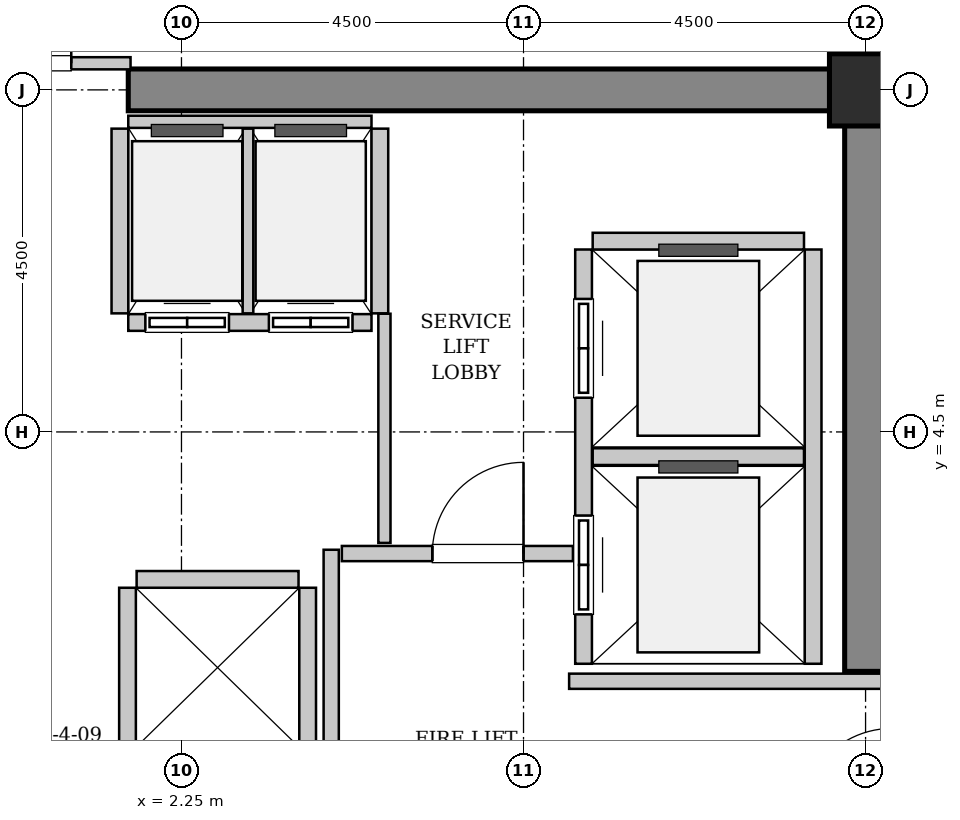
"""IFC4 building model, lengths in metres.
Left out: names, types, materials, properties, quantities, classifications, styles, units other than length and angle.
Written with IfcOpenShell. Run it as: python <this file> out.ifc"""

import sys

from ifc_helpers import new_model, si_unit, direction, frame, frame_2d, origin, origin_2d, place, context, subcontext, project, spatial, rectangle, hollow_rectangle, extrude, source, transform, mapped, element, fill, save


model = new_model("IFC4")
c1 = context("Model", 3, precision=1e-05, world=origin(), true_north=direction((0.0, 1.0)))
c2 = subcontext(c1, "Body", "Model", "MODEL_VIEW")
j1 = project(units=[si_unit("LENGTHUNIT", "METRE"), si_unit("PLANEANGLEUNIT", "RADIAN")], contexts=[c1])
p1 = place(None, origin())
s1 = spatial("IfcSite", under=j1, at=p1, CompositionType="ELEMENT")
p2 = place(p1, origin())
s2 = spatial("IfcBuilding", under=s1, at=p2, CompositionType="ELEMENT")
p3 = place(p2, frame((0.0, 0.0, 90.8)))
s3 = spatial("IfcBuildingStorey", under=s2, at=p3, CompositionType="ELEMENT", Elevation=90.8)
m1 = source(origin(), c2, "Body", "SweptSolid", [
    extrude(rectangle(XDim=9.975, YDim=0.55, at=frame_2d((4.987, 0.0))), origin(), (0.0, 0.0, 1.0), 3.8),
])
p4 = place(p3, frame((1.55, 9.0, 0.0), z_axis=(0.0, 0.0, 1.0), x_axis=(1.0, 0.0, 0.0)))
e1 = element("IfcWall", 1, at=p4, inside=s3, PredefinedType="SHEAR", context=c2, shape_type="MappedRepresentation", body=[
    mapped(m1, transform((0.0, 0.0, 0.0), x_axis=(1.0, 0.0, 0.0), y_axis=(0.0, 1.0, 0.0), z_axis=(0.0, 0.0, 1.0), scale=1.0)),
])
m2 = source(origin(), c2, "Body", "SweptSolid", [
    extrude(rectangle(XDim=7.375, YDim=0.55, at=frame_2d((3.688, 0.0))), origin(), (0.0, 0.0, 1.0), 3.8),
])
p5 = place(p3, frame((11.25, 1.35, 0.0), z_axis=(0.0, 0.0, 1.0), x_axis=(0.0, 1.0, 0.0)))
e2 = element("IfcWall", 2, at=p5, inside=s3, PredefinedType="SHEAR", context=c2, shape_type="MappedRepresentation", body=[
    mapped(m2, transform((0.0, 0.0, 0.0), x_axis=(1.0, 0.0, 0.0), y_axis=(0.0, 1.0, 0.0), z_axis=(0.0, 0.0, 1.0), scale=1.0)),
])
m3 = source(origin(), c2, "Body", "SweptSolid", [
    extrude(hollow_rectangle(XDim=0.95, YDim=0.95, WallThickness=0.045, InnerFilletRadius=0.045, OuterFilletRadius=0.09, at=origin_2d()), origin(), (0.0, 0.0, 1.0), 3.8),
])
p6 = place(p3, frame((11.25, 9.0, 0.0), z_axis=(0.0, 0.0, 1.0), x_axis=(1.0, 0.0, 0.0)))
e3 = element("IfcColumn", 3, at=p6, inside=s3, PredefinedType="COLUMN", context=c2, shape_type="MappedRepresentation", body=[
    mapped(m3, transform((0.0, 0.0, 0.0), x_axis=(1.0, 0.0, 0.0), y_axis=(0.0, 1.0, 0.0), z_axis=(0.0, 0.0, 1.0), scale=1.0)),
])
m4 = source(origin(), c2, "Body", "SweptSolid", [
    extrude(rectangle(XDim=5.45, YDim=0.22, at=frame_2d((2.725, 0.0))), origin(), (0.0, 0.0, 1.0), 3.535),
])
p7 = place(p3, frame((7.54, 6.9, 0.0), z_axis=(0.0, 0.0, 1.0), x_axis=(0.0, -1.0, 0.0)))
e4 = element("IfcWall", 4, at=p7, inside=s3, PredefinedType="SOLIDWALL", context=c2, shape_type="MappedRepresentation", body=[
    mapped(m4, transform((0.0, 0.0, 0.0), x_axis=(1.0, 0.0, 0.0), y_axis=(0.0, 1.0, 0.0), z_axis=(0.0, 0.0, 1.0), scale=1.0)),
])
p8 = place(p7, frame((3.5, 0.0, 0.0)))
e5 = element("IfcOpeningElement", 5, at=p8, cuts=e4, PredefinedType="OPENING", context=c2, shape_type="SweptSolid", body=[
    extrude(rectangle(XDim=1.3, YDim=2.3, at=frame_2d((0.65, 1.15))), frame((0.0, 0.12, 0.0), z_axis=(0.0, -1.0, 0.0), x_axis=(1.0, 0.0, 0.0)), (0.0, 0.0, 1.0), 0.24),
])
p9 = place(p7, frame((0.65, 0.0, 0.0)))
e6 = element("IfcOpeningElement", 6, at=p9, cuts=e4, PredefinedType="OPENING", context=c2, shape_type="SweptSolid", body=[
    extrude(rectangle(XDim=1.3, YDim=2.3, at=frame_2d((0.65, 1.15))), frame((0.0, 0.12, 0.0), z_axis=(0.0, -1.0, 0.0), x_axis=(1.0, 0.0, 0.0)), (0.0, 0.0, 1.0), 0.24),
])
p10 = place(p3, frame((10.56, 1.45, 0.0), z_axis=(0.0, 0.0, 1.0), x_axis=(0.0, 1.0, 0.0)))
e7 = element("IfcWall", 7, at=p10, inside=s3, PredefinedType="SOLIDWALL", context=c2, shape_type="MappedRepresentation", body=[
    mapped(m4, transform((0.0, 0.0, 0.0), x_axis=(1.0, 0.0, 0.0), y_axis=(0.0, 1.0, 0.0), z_axis=(0.0, 0.0, 1.0), scale=1.0)),
])
m5 = source(origin(), c2, "Body", "SweptSolid", [
    extrude(rectangle(XDim=2.78, YDim=0.22, at=frame_2d((1.39, 0.0))), origin(), (0.0, 0.0, 1.0), 3.535),
])
for number, where, z_axis, x_axis in (
    (8, (7.66, 4.175, 0.0), (0.0, 0.0, 1.0), (1.0, 0.0, 0.0)),
    (9, (10.44, 7.01, 0.0), (0.0, 0.0, 1.0), (-1.0, 0.0, 0.0)),
):
    element("IfcWall", number, at=place(p3, frame(where, z_axis=z_axis, x_axis=x_axis)), inside=s3, PredefinedType="SOLIDWALL", context=c2, shape_type="MappedRepresentation", body=[
        mapped(m5, transform((0.0, 0.0, 0.0), x_axis=(1.0, 0.0, 0.0), y_axis=(0.0, 1.0, 0.0), z_axis=(0.0, 0.0, 1.0), scale=1.0)),
    ])
m6 = source(origin(), c2, "Body", "SweptSolid", [
    extrude(rectangle(XDim=3.2, YDim=0.22, at=frame_2d((1.6, 0.0))), origin(), (0.0, 0.0, 1.0), 3.535),
])
p11 = place(p3, frame((1.55, 5.94, 0.0), z_axis=(0.0, 0.0, 1.0), x_axis=(1.0, 0.0, 0.0)))
e10 = element("IfcWall", 10, at=p11, inside=s3, PredefinedType="SOLIDWALL", context=c2, shape_type="MappedRepresentation", body=[
    mapped(m6, transform((0.0, 0.0, 0.0), x_axis=(1.0, 0.0, 0.0), y_axis=(0.0, 1.0, 0.0), z_axis=(0.0, 0.0, 1.0), scale=1.0)),
])
p12 = place(p11, frame((0.225, 0.0, 0.0)))
e11 = element("IfcOpeningElement", 11, at=p12, cuts=e10, PredefinedType="OPENING", context=c2, shape_type="SweptSolid", body=[
    extrude(rectangle(XDim=1.1, YDim=2.2, at=frame_2d((0.55, 1.1))), frame((0.0, 0.12, 0.0), z_axis=(0.0, -1.0, 0.0), x_axis=(1.0, 0.0, 0.0)), (0.0, 0.0, 1.0), 0.24),
])
p13 = place(p11, frame((1.85, 0.0, 0.0)))
e12 = element("IfcOpeningElement", 12, at=p13, cuts=e10, PredefinedType="OPENING", context=c2, shape_type="SweptSolid", body=[
    extrude(rectangle(XDim=1.1, YDim=2.2, at=frame_2d((0.55, 1.1))), frame((0.0, 0.12, 0.0), z_axis=(0.0, -1.0, 0.0), x_axis=(1.0, 0.0, 0.0)), (0.0, 0.0, 1.0), 0.24),
])
m7 = source(origin(), c2, "Body", "SweptSolid", [
    extrude(rectangle(XDim=3.2, YDim=0.16, at=frame_2d((1.6, 0.0))), origin(), (0.0, 0.0, 1.0), 2.425),
])
p14 = place(p3, frame((4.75, 8.58, 0.0), z_axis=(0.0, 0.0, 1.0), x_axis=(-1.0, 0.0, 0.0)))
e13 = element("IfcWall", 13, at=p14, inside=s3, PredefinedType="PARTITIONING", context=c2, shape_type="MappedRepresentation", body=[
    mapped(m7, transform((0.0, 0.0, 0.0), x_axis=(1.0, 0.0, 0.0), y_axis=(0.0, 1.0, 0.0), z_axis=(0.0, 0.0, 1.0), scale=1.0)),
])
m8 = source(origin(), c2, "Body", "SweptSolid", [
    extrude(rectangle(XDim=2.43, YDim=0.22, at=frame_2d((1.215, 0.0))), origin(), (0.0, 0.0, 1.0), 3.535),
])
p15 = place(p3, frame((1.44, 8.49, 0.0), z_axis=(0.0, 0.0, 1.0), x_axis=(0.0, -1.0, 0.0)))
e14 = element("IfcWall", 14, at=p15, inside=s3, PredefinedType="SOLIDWALL", context=c2, shape_type="MappedRepresentation", body=[
    mapped(m8, transform((0.0, 0.0, 0.0), x_axis=(1.0, 0.0, 0.0), y_axis=(0.0, 1.0, 0.0), z_axis=(0.0, 0.0, 1.0), scale=1.0)),
])
m9 = source(origin(), c2, "Body", "SweptSolid", [
    extrude(rectangle(XDim=2.43, YDim=0.14, at=frame_2d((1.215, 0.0))), origin(), (0.0, 0.0, 1.0), 3.535),
])
p16 = place(p3, frame((3.125, 6.06, 0.0), z_axis=(0.0, 0.0, 1.0), x_axis=(0.0, 1.0, 0.0)))
e15 = element("IfcWall", 15, at=p16, inside=s3, PredefinedType="PARTITIONING", context=c2, shape_type="MappedRepresentation", body=[
    mapped(m9, transform((0.0, 0.0, 0.0), x_axis=(1.0, 0.0, 0.0), y_axis=(0.0, 1.0, 0.0), z_axis=(0.0, 0.0, 1.0), scale=1.0)),
])
p17 = place(p3, frame((4.86, 6.06, 0.0), z_axis=(0.0, 0.0, 1.0), x_axis=(0.0, 1.0, 0.0)))
e16 = element("IfcWall", 16, at=p17, inside=s3, PredefinedType="SOLIDWALL", context=c2, shape_type="MappedRepresentation", body=[
    mapped(m8, transform((0.0, 0.0, 0.0), x_axis=(1.0, 0.0, 0.0), y_axis=(0.0, 1.0, 0.0), z_axis=(0.0, 0.0, 1.0), scale=1.0)),
])
m10 = source(origin(), c2, "Body", "SweptSolid", [
    extrude(rectangle(XDim=4.9, YDim=0.22, at=frame_2d((2.45, 0.0))), origin(), (0.0, 0.0, 1.0), 3.535),
])
for number, where, z_axis, x_axis in (
    (17, (1.54, 2.45, 0.0), (0.0, 0.0, 1.0), (0.0, -1.0, 0.0)),
    (18, (3.91, -2.45, 0.0), (0.0, 0.0, 1.0), (0.0, 1.0, 0.0)),
):
    element("IfcWall", number, at=place(p3, frame(where, z_axis=z_axis, x_axis=x_axis)), inside=s3, PredefinedType="SOLIDWALL", context=c2, shape_type="MappedRepresentation", body=[
        mapped(m10, transform((0.0, 0.0, 0.0), x_axis=(1.0, 0.0, 0.0), y_axis=(0.0, 1.0, 0.0), z_axis=(0.0, 0.0, 1.0), scale=1.0)),
    ])
m11 = source(origin(), c2, "Body", "SweptSolid", [
    extrude(rectangle(XDim=2.13, YDim=0.22, at=frame_2d((1.065, 0.0))), origin(), (0.0, 0.0, 1.0), 3.535),
])
p18 = place(p3, frame((3.79, 2.56, 0.0), z_axis=(0.0, 0.0, 1.0), x_axis=(-1.0, 0.0, 0.0)))
e19 = element("IfcWall", 19, at=p18, inside=s3, PredefinedType="SOLIDWALL", context=c2, shape_type="MappedRepresentation", body=[
    mapped(m11, transform((0.0, 0.0, 0.0), x_axis=(1.0, 0.0, 0.0), y_axis=(0.0, 1.0, 0.0), z_axis=(0.0, 0.0, 1.0), scale=1.0)),
])
m12 = source(origin(), c2, "Body", "SweptSolid", [
    extrude(rectangle(XDim=5.9, YDim=0.2, at=frame_2d((2.95, 0.0))), origin(), (0.0, 0.0, 1.0), 3.535),
])
p19 = place(p3, frame((4.22, -2.95, 0.0), z_axis=(0.0, 0.0, 1.0), x_axis=(0.0, 1.0, 0.0)))
e20 = element("IfcWall", 20, at=p19, inside=s3, PredefinedType="PARTITIONING", context=c2, shape_type="MappedRepresentation", body=[
    mapped(m12, transform((0.0, 0.0, 0.0), x_axis=(1.0, 0.0, 0.0), y_axis=(0.0, 1.0, 0.0), z_axis=(0.0, 0.0, 1.0), scale=1.0)),
])
m13 = source(origin(), c2, "Body", "SweptSolid", [
    extrude(rectangle(XDim=3.04, YDim=0.2, at=frame_2d((1.52, 0.0))), origin(), (0.0, 0.0, 1.0), 3.535),
])
p20 = place(p3, frame((4.36, 2.9, 0.0), z_axis=(0.0, 0.0, 1.0), x_axis=(1.0, 0.0, 0.0)))
e21 = element("IfcWall", 21, at=p20, inside=s3, PredefinedType="PARTITIONING", context=c2, shape_type="MappedRepresentation", body=[
    mapped(m13, transform((0.0, 0.0, 0.0), x_axis=(1.0, 0.0, 0.0), y_axis=(0.0, 1.0, 0.0), z_axis=(0.0, 0.0, 1.0), scale=1.0)),
])
p21 = place(p20, frame((1.19, 0.0, 0.0)))
e22 = element("IfcOpeningElement", 22, at=p21, cuts=e21, PredefinedType="OPENING", context=c2, shape_type="SweptSolid", body=[
    extrude(rectangle(XDim=1.2, YDim=2.15, at=frame_2d((0.6, 1.075))), frame((0.0, 0.11, 0.0), z_axis=(0.0, -1.0, 0.0), x_axis=(1.0, 0.0, 0.0)), (0.0, 0.0, 1.0), 0.22),
])
m14 = source(origin(), c2, "Body", "SweptSolid", [
    extrude(rectangle(XDim=4.11, YDim=0.2, at=frame_2d((2.055, 0.0))), origin(), (0.0, 0.0, 1.0), 3.535),
])
p22 = place(p3, frame((7.35, 1.22, 0.0), z_axis=(0.0, 0.0, 1.0), x_axis=(1.0, 0.0, 0.0)))
e23 = element("IfcWall", 23, at=p22, inside=s3, PredefinedType="PARTITIONING", context=c2, shape_type="MappedRepresentation", body=[
    mapped(m14, transform((0.0, 0.0, 0.0), x_axis=(1.0, 0.0, 0.0), y_axis=(0.0, 1.0, 0.0), z_axis=(0.0, 0.0, 1.0), scale=1.0)),
])
m15 = source(origin(), c2, "Body", "SweptSolid", [
    extrude(rectangle(XDim=3.16, YDim=0.16, at=frame_2d((1.58, 0.0))), origin(), (0.0, 0.0, 1.0), 2.425),
])
p23 = place(p3, frame((-1.58, 9.35, 0.0), z_axis=(0.0, 0.0, 1.0), x_axis=(1.0, 0.0, 0.0)))
e24 = element("IfcWall", 24, at=p23, inside=s3, PredefinedType="PARTITIONING", context=c2, shape_type="MappedRepresentation", body=[
    mapped(m15, transform((0.0, 0.0, 0.0), x_axis=(1.0, 0.0, 0.0), y_axis=(0.0, 1.0, 0.0), z_axis=(0.0, 0.0, 1.0), scale=1.0)),
])
p24 = place(p23, frame((0.78, 0.0, 0.0)))
e25 = element("IfcOpeningElement", 25, at=p24, cuts=e24, PredefinedType="OPENING", context=c2, shape_type="SweptSolid", body=[
    extrude(rectangle(XDim=1.6, YDim=2.3, at=frame_2d((0.8, 1.15))), frame((0.0, 0.09, 0.0), z_axis=(0.0, -1.0, 0.0), x_axis=(1.0, 0.0, 0.0)), (0.0, 0.0, 1.0), 0.18),
])
m16 = source(origin(), c2, "Body", "SweptSolid", [
    extrude(rectangle(XDim=3.015, YDim=0.16, at=frame_2d((1.507, 0.0))), origin(), (0.0, 0.0, 1.0), 3.535),
])
p25 = place(p3, frame((4.92, 3.04, 0.0), z_axis=(0.0, 0.0, 1.0), x_axis=(0.0, 1.0, 0.0)))
e26 = element("IfcWall", 26, at=p25, inside=s3, PredefinedType="PARTITIONING", context=c2, shape_type="MappedRepresentation", body=[
    mapped(m16, transform((0.0, 0.0, 0.0), x_axis=(1.0, 0.0, 0.0), y_axis=(0.0, 1.0, 0.0), z_axis=(0.0, 0.0, 1.0), scale=1.0)),
])
m17 = source(origin(), c2, "Body", "SweptSolid", [
    extrude(rectangle(XDim=1.3, YDim=2.3, at=frame_2d((0.65, 1.15))), frame((0.0, 0.025, 0.0), z_axis=(0.0, -1.0, 0.0), x_axis=(1.0, 0.0, 0.0)), (0.0, 0.0, 1.0), 0.05),
])
p26 = place(p8, origin())
e27 = element("IfcDoor", 27, at=p26, inside=s3, OperationType="SLIDING_TO_RIGHT", PredefinedType="DOOR", context=c2, shape_type="MappedRepresentation", body=[
    mapped(m17, transform((0.0, 0.0, 0.0), x_axis=(1.0, 0.0, 0.0), y_axis=(0.0, 1.0, 0.0), z_axis=(0.0, 0.0, 1.0), scale=1.0)),
])
fill(e5, e27)
p27 = place(p9, origin())
e28 = element("IfcDoor", 28, at=p27, inside=s3, OperationType="SLIDING_TO_RIGHT", PredefinedType="DOOR", context=c2, shape_type="MappedRepresentation", body=[
    mapped(m17, transform((0.0, 0.0, 0.0), x_axis=(1.0, 0.0, 0.0), y_axis=(0.0, 1.0, 0.0), z_axis=(0.0, 0.0, 1.0), scale=1.0)),
])
fill(e6, e28)
m18 = source(origin(), c2, "Body", "SweptSolid", [
    extrude(rectangle(XDim=1.1, YDim=2.2, at=frame_2d((0.55, 1.1))), frame((0.0, 0.025, 0.0), z_axis=(0.0, -1.0, 0.0), x_axis=(1.0, 0.0, 0.0)), (0.0, 0.0, 1.0), 0.05),
])
p28 = place(p12, origin())
e29 = element("IfcDoor", 29, at=p28, inside=s3, OperationType="DOUBLE_DOOR_SLIDING", PredefinedType="DOOR", context=c2, shape_type="MappedRepresentation", body=[
    mapped(m18, transform((0.0, 0.0, 0.0), x_axis=(1.0, 0.0, 0.0), y_axis=(0.0, 1.0, 0.0), z_axis=(0.0, 0.0, 1.0), scale=1.0)),
])
fill(e11, e29)
p29 = place(p13, origin())
e30 = element("IfcDoor", 30, at=p29, inside=s3, OperationType="DOUBLE_DOOR_SLIDING", PredefinedType="DOOR", context=c2, shape_type="MappedRepresentation", body=[
    mapped(m18, transform((0.0, 0.0, 0.0), x_axis=(1.0, 0.0, 0.0), y_axis=(0.0, 1.0, 0.0), z_axis=(0.0, 0.0, 1.0), scale=1.0)),
])
fill(e12, e30)
m19 = source(origin(), c2, "Body", "SweptSolid", [
    extrude(rectangle(XDim=1.2, YDim=2.15, at=frame_2d((0.6, 1.075))), frame((0.0, 0.025, 0.0), z_axis=(0.0, -1.0, 0.0), x_axis=(1.0, 0.0, 0.0)), (0.0, 0.0, 1.0), 0.05),
])
p30 = place(p21, origin())
e31 = element("IfcDoor", 31, at=p30, inside=s3, OperationType="SINGLE_SWING_RIGHT", PredefinedType="DOOR", context=c2, shape_type="MappedRepresentation", body=[
    mapped(m19, transform((0.0, 0.0, 0.0), x_axis=(1.0, 0.0, 0.0), y_axis=(0.0, 1.0, 0.0), z_axis=(0.0, 0.0, 1.0), scale=1.0)),
])
fill(e22, e31)
m20 = source(origin(), c2, "Body", "SweptSolid", [
    extrude(rectangle(XDim=1.6, YDim=2.3, at=frame_2d((0.8, 1.15))), frame((0.0, 0.025, 0.0), z_axis=(0.0, -1.0, 0.0), x_axis=(1.0, 0.0, 0.0)), (0.0, 0.0, 1.0), 0.05),
])
p31 = place(p24, origin())
e32 = element("IfcDoor", 32, at=p31, inside=s3, OperationType="DOUBLE_DOOR_SINGLE_SWING", PredefinedType="DOOR", context=c2, shape_type="MappedRepresentation", body=[
    mapped(m20, transform((0.0, 0.0, 0.0), x_axis=(1.0, 0.0, 0.0), y_axis=(0.0, 1.0, 0.0), z_axis=(0.0, 0.0, 1.0), scale=1.0)),
])
fill(e25, e32)
save(model, sys.argv[1])
